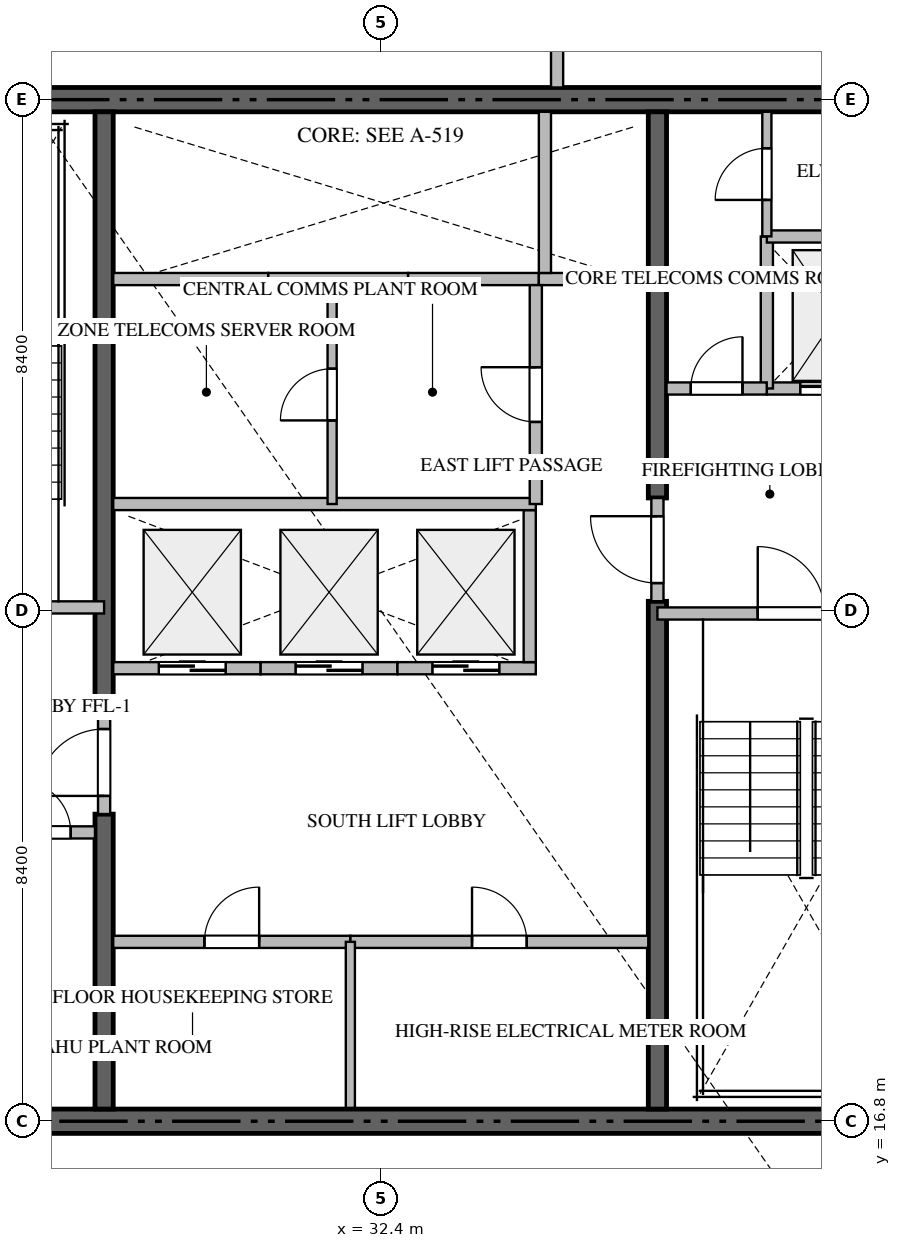
"""IFC4 building model, lengths in metres.
Left out: names, types, materials, properties, quantities, classifications, styles, units other than length and angle.
Written with IfcOpenShell. Run it as: python <this file> out.ifc"""

import sys

from ifc_helpers import new_model, si_unit, direction, frame, frame_2d, origin, place, context, subcontext, project, spatial, rectangle, extrude, source, transform, mapped, element, fill, save


model = new_model("IFC4")
c1 = context("Model", 3, precision=1e-05, world=origin(), true_north=direction((0.0, 1.0)))
c2 = subcontext(c1, "Body", "Model", "MODEL_VIEW")
j1 = project(units=[si_unit("LENGTHUNIT", "METRE"), si_unit("PLANEANGLEUNIT", "RADIAN")], contexts=[c1])
p1 = place(None, origin())
s1 = spatial("IfcSite", under=j1, at=p1, CompositionType="ELEMENT")
p2 = place(p1, origin())
s2 = spatial("IfcBuilding", under=s1, at=p2, CompositionType="ELEMENT")
p3 = place(p2, frame((0.0, 0.0, 168.9)))
s3 = spatial("IfcBuildingStorey", under=s2, at=p3, CompositionType="ELEMENT", Elevation=168.9)
for number, where, z_axis, x_axis in (
    (1, (23.4, 16.8, -0.26), (0.0, 0.0, 1.0), (1.0, 0.0, 0.0)),
    (2, (41.4, 33.6, -0.26), (0.0, 0.0, 1.0), (-1.0, 0.0, 0.0)),
):
    element("IfcWall", number, at=place(p3, frame(where, z_axis=z_axis, x_axis=x_axis)), inside=s3, PredefinedType="SHEAR", context=c2, shape_type="SweptSolid", body=[
        extrude(rectangle(XDim=18.0, YDim=0.4, at=frame_2d((9.0, 0.0))), origin(), (0.0, 0.0, 1.0), 3.748),
    ])
p4 = place(p3, frame((27.85, 17.0, -0.26), z_axis=(0.0, 0.0, 1.0), x_axis=(0.0, 1.0, 0.0)))
e3 = element("IfcWall", 3, at=p4, inside=s3, PredefinedType="SHEAR", context=c2, shape_type="SweptSolid", body=[
    extrude(rectangle(XDim=4.85, YDim=0.3, at=frame_2d((2.425, 0.0))), origin(), (0.0, 0.0, 1.0), 3.748),
])
p5 = place(p3, frame((27.85, 23.55, -0.26), z_axis=(0.0, 0.0, 1.0), x_axis=(0.0, 1.0, 0.0)))
e4 = element("IfcWall", 4, at=p5, inside=s3, PredefinedType="SHEAR", context=c2, shape_type="SweptSolid", body=[
    extrude(rectangle(XDim=9.85, YDim=0.3, at=frame_2d((4.925, 0.0))), origin(), (0.0, 0.0, 1.0), 3.748),
])
p6 = place(p3, frame((36.95, 17.0, -0.26), z_axis=(0.0, 0.0, 1.0), x_axis=(0.0, 1.0, 0.0)))
e5 = element("IfcWall", 5, at=p6, inside=s3, PredefinedType="SHEAR", context=c2, shape_type="SweptSolid", body=[
    extrude(rectangle(XDim=8.35, YDim=0.3, at=frame_2d((4.175, 0.0))), origin(), (0.0, 0.0, 1.0), 3.748),
])
p7 = place(p3, frame((36.95, 27.05, -0.26), z_axis=(0.0, 0.0, 1.0), x_axis=(0.0, 1.0, 0.0)))
e6 = element("IfcWall", 6, at=p7, inside=s3, PredefinedType="SHEAR", context=c2, shape_type="SweptSolid", body=[
    extrude(rectangle(XDim=6.35, YDim=0.3, at=frame_2d((3.175, 0.0))), origin(), (0.0, 0.0, 1.0), 3.748),
])
p8 = place(p3, frame((23.4, 25.25, 0.0), z_axis=(0.0, 0.0, 1.0), x_axis=(1.0, 0.0, 0.0)))
e7 = element("IfcWall", 7, at=p8, inside=s3, PredefinedType="STANDARD", context=c2, shape_type="SweptSolid", body=[
    extrude(rectangle(XDim=4.45, YDim=0.2, at=frame_2d((2.225, 0.0))), origin(), (0.0, 0.0, 1.0), 3.49),
])
p9 = place(p8, frame((1.65, 0.0, 0.0)))
e8 = element("IfcOpeningElement", 8, at=p9, cuts=e7, PredefinedType="OPENING", context=c2, shape_type="SweptSolid", body=[
    extrude(rectangle(XDim=1.1, YDim=2.15, at=frame_2d((0.55, 1.075))), frame((0.0, 0.11, 0.0), z_axis=(0.0, -1.0, 0.0), x_axis=(1.0, 0.0, 0.0)), (0.0, 0.0, 1.0), 0.22),
])
p10 = place(p3, frame((36.95, 25.15, 0.0), z_axis=(0.0, 0.0, 1.0), x_axis=(1.0, 0.0, 0.0)))
e9 = element("IfcWall", 9, at=p10, inside=s3, PredefinedType="STANDARD", context=c2, shape_type="SweptSolid", body=[
    extrude(rectangle(XDim=4.45, YDim=0.2, at=frame_2d((2.225, 0.0))), origin(), (0.0, 0.0, 1.0), 3.49),
])
p11 = place(p10, frame((1.65, 0.0, 0.0)))
e10 = element("IfcOpeningElement", 10, at=p11, cuts=e9, PredefinedType="OPENING", context=c2, shape_type="SweptSolid", body=[
    extrude(rectangle(XDim=1.1, YDim=2.15, at=frame_2d((0.55, 1.075))), frame((0.0, 0.11, 0.0), z_axis=(0.0, -1.0, 0.0), x_axis=(1.0, 0.0, 0.0)), (0.0, 0.0, 1.0), 0.22),
])
p12 = place(p3, frame((38.75, 28.85, 0.0), z_axis=(0.0, 0.0, 1.0), x_axis=(1.0, 0.0, 0.0)))
e11 = element("IfcWall", 11, at=p12, inside=s3, PredefinedType="STANDARD", context=c2, shape_type="SweptSolid", body=[
    extrude(rectangle(XDim=2.45, YDim=0.2, at=frame_2d((1.225, 0.0))), origin(), (0.0, 0.0, 1.0), 3.49),
])
p13 = place(p12, frame((0.55, 0.0, 0.0)))
e12 = element("IfcOpeningElement", 12, at=p13, cuts=e11, PredefinedType="OPENING", context=c2, shape_type="SweptSolid", body=[
    extrude(rectangle(XDim=1.2, YDim=2.2, at=frame_2d((0.6, 1.1))), frame((0.0, 0.11, 0.0), z_axis=(0.0, -1.0, 0.0), x_axis=(1.0, 0.0, 0.0)), (0.0, 0.0, 1.0), 0.22),
])
p14 = place(p3, frame((28.0, 24.25, 0.0), z_axis=(0.0, 0.0, 1.0), x_axis=(1.0, 0.0, 0.0)))
e13 = element("IfcWall", 13, at=p14, inside=s3, PredefinedType="STANDARD", context=c2, shape_type="SweptSolid", body=[
    extrude(rectangle(XDim=2.425, YDim=0.2, at=frame_2d((1.212, 0.0))), origin(), (0.0, 0.0, 1.0), 3.49),
])
p15 = place(p14, frame((0.75, 0.0, 0.0)))
e14 = element("IfcOpeningElement", 14, at=p15, cuts=e13, PredefinedType="OPENING", context=c2, shape_type="SweptSolid", body=[
    extrude(rectangle(XDim=1.1, YDim=2.2, at=frame_2d((0.55, 1.1))), frame((0.0, 0.11, 0.0), z_axis=(0.0, -1.0, 0.0), x_axis=(1.0, 0.0, 0.0)), (0.0, 0.0, 1.0), 0.22),
])
p16 = place(p3, frame((30.425, 24.25, 0.0), z_axis=(0.0, 0.0, 1.0), x_axis=(1.0, 0.0, 0.0)))
e15 = element("IfcWall", 15, at=p16, inside=s3, PredefinedType="STANDARD", context=c2, shape_type="SweptSolid", body=[
    extrude(rectangle(XDim=2.25, YDim=0.2, at=frame_2d((1.125, 0.0))), origin(), (0.0, 0.0, 1.0), 3.49),
])
p17 = place(p16, frame((0.575, 0.0, 0.0)))
e16 = element("IfcOpeningElement", 16, at=p17, cuts=e15, PredefinedType="OPENING", context=c2, shape_type="SweptSolid", body=[
    extrude(rectangle(XDim=1.1, YDim=2.2, at=frame_2d((0.55, 1.1))), frame((0.0, 0.11, 0.0), z_axis=(0.0, -1.0, 0.0), x_axis=(1.0, 0.0, 0.0)), (0.0, 0.0, 1.0), 0.22),
])
p18 = place(p3, frame((32.675, 24.25, 0.0), z_axis=(0.0, 0.0, 1.0), x_axis=(1.0, 0.0, 0.0)))
e17 = element("IfcWall", 17, at=p18, inside=s3, PredefinedType="STANDARD", context=c2, shape_type="SweptSolid", body=[
    extrude(rectangle(XDim=2.275, YDim=0.2, at=frame_2d((1.137, 0.0))), origin(), (0.0, 0.0, 1.0), 3.49),
])
p19 = place(p18, frame((0.575, 0.0, 0.0)))
e18 = element("IfcOpeningElement", 18, at=p19, cuts=e17, PredefinedType="OPENING", context=c2, shape_type="SweptSolid", body=[
    extrude(rectangle(XDim=1.1, YDim=2.2, at=frame_2d((0.55, 1.1))), frame((0.0, 0.11, 0.0), z_axis=(0.0, -1.0, 0.0), x_axis=(1.0, 0.0, 0.0)), (0.0, 0.0, 1.0), 0.22),
])
p20 = place(p3, frame((34.85, 24.35, 0.0), z_axis=(0.0, 0.0, 1.0), x_axis=(0.0, 1.0, 0.0)))
e19 = element("IfcWall", 19, at=p20, inside=s3, PredefinedType="STANDARD", context=c2, shape_type="SweptSolid", body=[
    extrude(rectangle(XDim=2.5, YDim=0.2, at=frame_2d((1.25, 0.0))), origin(), (0.0, 0.0, 1.0), 3.49),
])
p21 = place(p3, frame((28.0, 30.65, 0.0), z_axis=(0.0, 0.0, 1.0), x_axis=(1.0, 0.0, 0.0)))
e20 = element("IfcWall", 20, at=p21, inside=s3, PredefinedType="STANDARD", context=c2, shape_type="SweptSolid", body=[
    extrude(rectangle(XDim=2.55, YDim=0.2, at=frame_2d((1.275, 0.0))), origin(), (0.0, 0.0, 1.0), 3.49),
])
p22 = place(p3, frame((30.55, 30.65, 0.0), z_axis=(0.0, 0.0, 1.0), x_axis=(1.0, 0.0, 0.0)))
e21 = element("IfcWall", 21, at=p22, inside=s3, PredefinedType="STANDARD", context=c2, shape_type="SweptSolid", body=[
    extrude(rectangle(XDim=2.3, YDim=0.2, at=frame_2d((1.15, 0.0))), origin(), (0.0, 0.0, 1.0), 3.49),
])
p23 = place(p3, frame((32.85, 30.65, 0.0), z_axis=(0.0, 0.0, 1.0), x_axis=(1.0, 0.0, 0.0)))
e22 = element("IfcWall", 22, at=p23, inside=s3, PredefinedType="STANDARD", context=c2, shape_type="SweptSolid", body=[
    extrude(rectangle(XDim=2.15, YDim=0.2, at=frame_2d((1.075, 0.0))), origin(), (0.0, 0.0, 1.0), 3.49),
])
p24 = place(p3, frame((35.0, 30.65, 0.0), z_axis=(0.0, 0.0, 1.0), x_axis=(1.0, 0.0, 0.0)))
e23 = element("IfcWall", 23, at=p24, inside=s3, PredefinedType="STANDARD", context=c2, shape_type="SweptSolid", body=[
    extrude(rectangle(XDim=1.8, YDim=0.2, at=frame_2d((0.9, 0.0))), origin(), (0.0, 0.0, 1.0), 3.49),
])
p25 = place(p3, frame((35.1, 30.75, 0.0), z_axis=(0.0, 0.0, 1.0), x_axis=(0.0, 1.0, 0.0)))
e24 = element("IfcWall", 24, at=p25, inside=s3, PredefinedType="STANDARD", context=c2, shape_type="SweptSolid", body=[
    extrude(rectangle(XDim=2.65, YDim=0.2, at=frame_2d((1.325, 0.0))), origin(), (0.0, 0.0, 1.0), 3.49),
])
p26 = place(p3, frame((26.052, 21.55, 0.0), z_axis=(0.0, 0.0, 1.0), x_axis=(1.0, 0.0, 0.0)))
e25 = element("IfcWall", 25, at=p26, inside=s3, PredefinedType="STANDARD", context=c2, shape_type="SweptSolid", body=[
    extrude(rectangle(XDim=1.648, YDim=0.2, at=frame_2d((0.824, 0.0))), origin(), (0.0, 0.0, 1.0), 3.49),
])
p27 = place(p26, frame((0.399, 0.0, 0.0)))
e26 = element("IfcOpeningElement", 26, at=p27, cuts=e25, PredefinedType="OPENING", context=c2, shape_type="SweptSolid", body=[
    extrude(rectangle(XDim=0.85, YDim=2.1, at=frame_2d((0.425, 1.05))), frame((0.0, 0.11, 0.0), z_axis=(0.0, -1.0, 0.0), x_axis=(1.0, 0.0, 0.0)), (0.0, 0.0, 1.0), 0.22),
])
p28 = place(p3, frame((38.75, 28.85, 0.0), z_axis=(0.0, 0.0, 1.0), x_axis=(0.0, 1.0, 0.0)))
e27 = element("IfcWall", 27, at=p28, inside=s3, PredefinedType="STANDARD", context=c2, shape_type="SweptSolid", body=[
    extrude(rectangle(XDim=2.5, YDim=0.2, at=frame_2d((1.25, 0.0))), origin(), (0.0, 0.0, 1.0), 3.49),
])
p29 = place(p3, frame((38.75, 31.35, 0.0), z_axis=(0.0, 0.0, 1.0), x_axis=(1.0, 0.0, 0.0)))
e28 = element("IfcWall", 28, at=p29, inside=s3, PredefinedType="STANDARD", context=c2, shape_type="SweptSolid", body=[
    extrude(rectangle(XDim=2.45, YDim=0.2, at=frame_2d((1.225, 0.0))), origin(), (0.0, 0.0, 1.0), 3.49),
])
p30 = place(p3, frame((37.1, 28.85, 0.0), z_axis=(0.0, 0.0, 1.0), x_axis=(1.0, 0.0, 0.0)))
e29 = element("IfcWall", 29, at=p30, inside=s3, PredefinedType="STANDARD", context=c2, shape_type="SweptSolid", body=[
    extrude(rectangle(XDim=1.648, YDim=0.2, at=frame_2d((0.824, 0.0))), origin(), (0.0, 0.0, 1.0), 3.49),
])
p31 = place(p30, frame((0.399, 0.0, 0.0)))
e30 = element("IfcOpeningElement", 30, at=p31, cuts=e29, PredefinedType="OPENING", context=c2, shape_type="SweptSolid", body=[
    extrude(rectangle(XDim=0.85, YDim=2.1, at=frame_2d((0.425, 1.05))), frame((0.0, 0.11, 0.0), z_axis=(0.0, -1.0, 0.0), x_axis=(1.0, 0.0, 0.0)), (0.0, 0.0, 1.0), 0.22),
])
p32 = place(p3, frame((27.85, 21.852, 0.0), z_axis=(0.0, 0.0, 1.0), x_axis=(0.0, 1.0, 0.0)))
e31 = element("IfcWall", 31, at=p32, inside=s3, PredefinedType="STANDARD", context=c2, shape_type="SweptSolid", body=[
    extrude(rectangle(XDim=1.696, YDim=0.2, at=frame_2d((0.848, 0.0))), origin(), (0.0, 0.0, 1.0), 3.49),
])
p33 = place(p32, frame((0.298, 0.0, 0.0)))
e32 = element("IfcOpeningElement", 32, at=p33, cuts=e31, PredefinedType="OPENING", context=c2, shape_type="SweptSolid", body=[
    extrude(rectangle(XDim=1.1, YDim=2.15, at=frame_2d((0.55, 1.075))), frame((0.0, 0.11, 0.0), z_axis=(0.0, -1.0, 0.0), x_axis=(1.0, 0.0, 0.0)), (0.0, 0.0, 1.0), 0.22),
])
p34 = place(p3, frame((36.95, 25.352, 0.0), z_axis=(0.0, 0.0, 1.0), x_axis=(0.0, 1.0, 0.0)))
e33 = element("IfcWall", 33, at=p34, inside=s3, PredefinedType="STANDARD", context=c2, shape_type="SweptSolid", body=[
    extrude(rectangle(XDim=1.696, YDim=0.2, at=frame_2d((0.848, 0.0))), origin(), (0.0, 0.0, 1.0), 3.49),
])
p35 = place(p34, frame((0.298, 0.0, 0.0)))
e34 = element("IfcOpeningElement", 34, at=p35, cuts=e33, PredefinedType="OPENING", context=c2, shape_type="SweptSolid", body=[
    extrude(rectangle(XDim=1.1, YDim=2.15, at=frame_2d((0.55, 1.075))), frame((0.0, 0.11, 0.0), z_axis=(0.0, -1.0, 0.0), x_axis=(1.0, 0.0, 0.0)), (0.0, 0.0, 1.0), 0.22),
])
p36 = place(p3, frame((28.0, 26.95, 0.0), z_axis=(0.0, 0.0, 1.0), x_axis=(1.0, 0.0, 0.0)))
e35 = element("IfcWall", 35, at=p36, inside=s3, PredefinedType="STANDARD", context=c2, shape_type="SweptSolid", body=[
    extrude(rectangle(XDim=6.95, YDim=0.2, at=frame_2d((3.475, 0.0))), origin(), (0.0, 0.0, 1.0), 3.49),
])
p37 = place(p3, frame((38.75, 31.352, 0.0), z_axis=(0.0, 0.0, 1.0), x_axis=(0.0, 1.0, 0.0)))
e36 = element("IfcWall", 36, at=p37, inside=s3, PredefinedType="PARTITIONING", context=c2, shape_type="SweptSolid", body=[
    extrude(rectangle(XDim=2.048, YDim=0.15, at=frame_2d((1.024, 0.0))), origin(), (0.0, 0.0, 1.0), 3.49),
])
p38 = place(p37, frame((0.599, 0.0, 0.0)))
e37 = element("IfcOpeningElement", 37, at=p38, cuts=e36, PredefinedType="OPENING", context=c2, shape_type="SweptSolid", body=[
    extrude(rectangle(XDim=0.85, YDim=2.1, at=frame_2d((0.425, 1.05))), frame((0.0, 0.085, 0.0), z_axis=(0.0, -1.0, 0.0), x_axis=(1.0, 0.0, 0.0)), (0.0, 0.0, 1.0), 0.17),
])
p39 = place(p3, frame((34.95, 26.95, 0.0), z_axis=(0.0, 0.0, 1.0), x_axis=(0.0, 1.0, 0.0)))
e38 = element("IfcWall", 38, at=p39, inside=s3, PredefinedType="STANDARD", context=c2, shape_type="SweptSolid", body=[
    extrude(rectangle(XDim=3.6, YDim=0.2, at=frame_2d((1.8, 0.0))), origin(), (0.0, 0.0, 1.0), 3.49),
])
p40 = place(p39, frame((1.35, 0.0, 0.0)))
e39 = element("IfcOpeningElement", 39, at=p40, cuts=e38, PredefinedType="OPENING", context=c2, shape_type="SweptSolid", body=[
    extrude(rectangle(XDim=0.9, YDim=2.1, at=frame_2d((0.45, 1.05))), frame((0.0, 0.11, 0.0), z_axis=(0.0, -1.0, 0.0), x_axis=(1.0, 0.0, 0.0)), (0.0, 0.0, 1.0), 0.22),
])
p41 = place(p3, frame((31.6, 26.95, 0.0), z_axis=(0.0, 0.0, 1.0), x_axis=(0.0, 1.0, 0.0)))
e40 = element("IfcWall", 40, at=p41, inside=s3, PredefinedType="PARTITIONING", context=c2, shape_type="SweptSolid", body=[
    extrude(rectangle(XDim=3.6, YDim=0.15, at=frame_2d((1.8, 0.0))), origin(), (0.0, 0.0, 1.0), 3.49),
])
p42 = place(p41, frame((1.375, 0.0, 0.0)))
e41 = element("IfcOpeningElement", 41, at=p42, cuts=e40, PredefinedType="OPENING", context=c2, shape_type="SweptSolid", body=[
    extrude(rectangle(XDim=0.85, YDim=2.1, at=frame_2d((0.425, 1.05))), frame((0.0, 0.085, 0.0), z_axis=(0.0, -1.0, 0.0), x_axis=(1.0, 0.0, 0.0)), (0.0, 0.0, 1.0), 0.17),
])
p43 = place(p3, frame((28.0, 19.75, 0.0), z_axis=(0.0, 0.0, 1.0), x_axis=(1.0, 0.0, 0.0)))
e42 = element("IfcWall", 42, at=p43, inside=s3, PredefinedType="STANDARD", context=c2, shape_type="SweptSolid", body=[
    extrude(rectangle(XDim=3.9, YDim=0.2, at=frame_2d((1.95, 0.0))), origin(), (0.0, 0.0, 1.0), 3.49),
])
p44 = place(p43, frame((1.5, 0.0, 0.0)))
e43 = element("IfcOpeningElement", 43, at=p44, cuts=e42, PredefinedType="OPENING", context=c2, shape_type="SweptSolid", body=[
    extrude(rectangle(XDim=0.9, YDim=2.1, at=frame_2d((0.45, 1.05))), frame((0.0, 0.11, 0.0), z_axis=(0.0, -1.0, 0.0), x_axis=(1.0, 0.0, 0.0)), (0.0, 0.0, 1.0), 0.22),
])
p45 = place(p3, frame((31.902, 19.75, 0.0), z_axis=(0.0, 0.0, 1.0), x_axis=(1.0, 0.0, 0.0)))
e44 = element("IfcWall", 44, at=p45, inside=s3, PredefinedType="STANDARD", context=c2, shape_type="SweptSolid", body=[
    extrude(rectangle(XDim=4.898, YDim=0.2, at=frame_2d((2.449, 0.0))), origin(), (0.0, 0.0, 1.0), 3.49),
])
p46 = place(p45, frame((1.999, 0.0, 0.0)))
e45 = element("IfcOpeningElement", 45, at=p46, cuts=e44, PredefinedType="OPENING", context=c2, shape_type="SweptSolid", body=[
    extrude(rectangle(XDim=0.9, YDim=2.1, at=frame_2d((0.45, 1.05))), frame((0.0, 0.11, 0.0), z_axis=(0.0, -1.0, 0.0), x_axis=(1.0, 0.0, 0.0)), (0.0, 0.0, 1.0), 0.22),
])
p47 = place(p3, frame((31.9, 17.02, 0.0), z_axis=(0.0, 0.0, 1.0), x_axis=(0.0, 1.0, 0.0)))
e46 = element("IfcWall", 46, at=p47, inside=s3, PredefinedType="PARTITIONING", context=c2, shape_type="SweptSolid", body=[
    extrude(rectangle(XDim=2.73, YDim=0.15, at=frame_2d((1.365, 0.0))), origin(), (0.0, 0.0, 1.0), 3.49),
])
p48 = place(p3, frame((35.3, 33.8, 0.0), z_axis=(0.0, 0.0, 1.0), x_axis=(0.0, 1.0, 0.0)))
e47 = element("IfcWall", 47, at=p48, inside=s3, PredefinedType="PARTITIONING", context=c2, shape_type="SweptSolid", body=[
    extrude(rectangle(XDim=15.118, YDim=0.2, at=frame_2d((7.559, 0.0))), origin(), (0.0, 0.0, 1.0), 3.49),
])
m1 = source(origin(), c2, "Body", "SweptSolid", [
    extrude(rectangle(XDim=1.1, YDim=2.15, at=frame_2d((0.55, 1.075))), frame((0.0, 0.025, 0.0), z_axis=(0.0, -1.0, 0.0), x_axis=(1.0, 0.0, 0.0)), (0.0, 0.0, 1.0), 0.05),
])
p49 = place(p11, origin())
e48 = element("IfcDoor", 48, at=p49, inside=s3, OperationType="SINGLE_SWING_LEFT", PredefinedType="DOOR", context=c2, shape_type="MappedRepresentation", body=[
    mapped(m1, transform((0.0, 0.0, 0.0), scale=1.0)),
])
fill(e10, e48)
m2 = source(origin(), c2, "Body", "SweptSolid", [
    extrude(rectangle(XDim=1.2, YDim=2.2, at=frame_2d((0.6, 1.1))), frame((0.0, 0.025, 0.0), z_axis=(0.0, -1.0, 0.0), x_axis=(1.0, 0.0, 0.0)), (0.0, 0.0, 1.0), 0.05),
])
p50 = place(p13, origin())
e49 = element("IfcDoor", 49, at=p50, inside=s3, OperationType="DOUBLE_DOOR_SLIDING", PredefinedType="DOOR", context=c2, shape_type="MappedRepresentation", body=[
    mapped(m2, transform((0.0, 0.0, 0.0), scale=1.0)),
])
fill(e12, e49)
m3 = source(origin(), c2, "Body", "SweptSolid", [
    extrude(rectangle(XDim=1.1, YDim=2.2, at=frame_2d((0.55, 1.1))), frame((0.0, 0.025, 0.0), z_axis=(0.0, -1.0, 0.0), x_axis=(1.0, 0.0, 0.0)), (0.0, 0.0, 1.0), 0.05),
])
p51 = place(p15, origin())
e50 = element("IfcDoor", 50, at=p51, inside=s3, OperationType="DOUBLE_DOOR_SLIDING", PredefinedType="DOOR", context=c2, shape_type="MappedRepresentation", body=[
    mapped(m3, transform((0.0, 0.0, 0.0), scale=1.0)),
])
fill(e14, e50)
p52 = place(p17, origin())
e51 = element("IfcDoor", 51, at=p52, inside=s3, OperationType="DOUBLE_DOOR_SLIDING", PredefinedType="DOOR", context=c2, shape_type="MappedRepresentation", body=[
    mapped(m3, transform((0.0, 0.0, 0.0), scale=1.0)),
])
fill(e16, e51)
p53 = place(p19, origin())
e52 = element("IfcDoor", 52, at=p53, inside=s3, OperationType="DOUBLE_DOOR_SLIDING", PredefinedType="DOOR", context=c2, shape_type="MappedRepresentation", body=[
    mapped(m3, transform((0.0, 0.0, 0.0), scale=1.0)),
])
fill(e18, e52)
m4 = source(origin(), c2, "Body", "SweptSolid", [
    extrude(rectangle(XDim=0.85, YDim=2.1, at=frame_2d((0.425, 1.05))), frame((0.0, 0.025, 0.0), z_axis=(0.0, -1.0, 0.0), x_axis=(1.0, 0.0, 0.0)), (0.0, 0.0, 1.0), 0.05),
])
p54 = place(p27, origin())
e53 = element("IfcDoor", 53, at=p54, inside=s3, OperationType="SINGLE_SWING_LEFT", PredefinedType="DOOR", context=c2, shape_type="MappedRepresentation", body=[
    mapped(m4, transform((0.0, 0.0, 0.0), scale=1.0)),
])
fill(e26, e53)
p55 = place(p31, origin())
e54 = element("IfcDoor", 54, at=p55, inside=s3, OperationType="SINGLE_SWING_RIGHT", PredefinedType="DOOR", context=c2, shape_type="MappedRepresentation", body=[
    mapped(m4, transform((0.0, 0.0, 0.0), scale=1.0)),
])
fill(e30, e54)
p56 = place(p33, origin())
e55 = element("IfcDoor", 55, at=p56, inside=s3, OperationType="SINGLE_SWING_LEFT", PredefinedType="DOOR", context=c2, shape_type="MappedRepresentation", body=[
    mapped(m1, transform((0.0, 0.0, 0.0), scale=1.0)),
])
fill(e32, e55)
p57 = place(p35, origin())
e56 = element("IfcDoor", 56, at=p57, inside=s3, OperationType="SINGLE_SWING_RIGHT", PredefinedType="DOOR", context=c2, shape_type="MappedRepresentation", body=[
    mapped(m1, transform((0.0, 0.0, 0.0), scale=1.0)),
])
fill(e34, e56)
p58 = place(p38, origin())
e57 = element("IfcDoor", 57, at=p58, inside=s3, OperationType="SINGLE_SWING_LEFT", PredefinedType="DOOR", context=c2, shape_type="MappedRepresentation", body=[
    mapped(m4, transform((0.0, 0.0, 0.0), scale=1.0)),
])
fill(e37, e57)
m5 = source(origin(), c2, "Body", "SweptSolid", [
    extrude(rectangle(XDim=0.9, YDim=2.1, at=frame_2d((0.45, 1.05))), frame((0.0, 0.025, 0.0), z_axis=(0.0, -1.0, 0.0), x_axis=(1.0, 0.0, 0.0)), (0.0, 0.0, 1.0), 0.05),
])
p59 = place(p40, origin())
e58 = element("IfcDoor", 58, at=p59, inside=s3, OperationType="SINGLE_SWING_RIGHT", PredefinedType="DOOR", context=c2, shape_type="MappedRepresentation", body=[
    mapped(m5, transform((0.0, 0.0, 0.0), scale=1.0)),
])
fill(e39, e58)
p60 = place(p42, origin())
e59 = element("IfcDoor", 59, at=p60, inside=s3, OperationType="SINGLE_SWING_LEFT", PredefinedType="DOOR", context=c2, shape_type="MappedRepresentation", body=[
    mapped(m4, transform((0.0, 0.0, 0.0), scale=1.0)),
])
fill(e41, e59)
p61 = place(p44, origin())
e60 = element("IfcDoor", 60, at=p61, inside=s3, OperationType="SINGLE_SWING_RIGHT", PredefinedType="DOOR", context=c2, shape_type="MappedRepresentation", body=[
    mapped(m5, transform((0.0, 0.0, 0.0), scale=1.0)),
])
fill(e43, e60)
p62 = place(p46, origin())
e61 = element("IfcDoor", 61, at=p62, inside=s3, OperationType="SINGLE_SWING_LEFT", PredefinedType="DOOR", context=c2, shape_type="MappedRepresentation", body=[
    mapped(m5, transform((0.0, 0.0, 0.0), scale=1.0)),
])
fill(e45, e61)
save(model, sys.argv[1])
